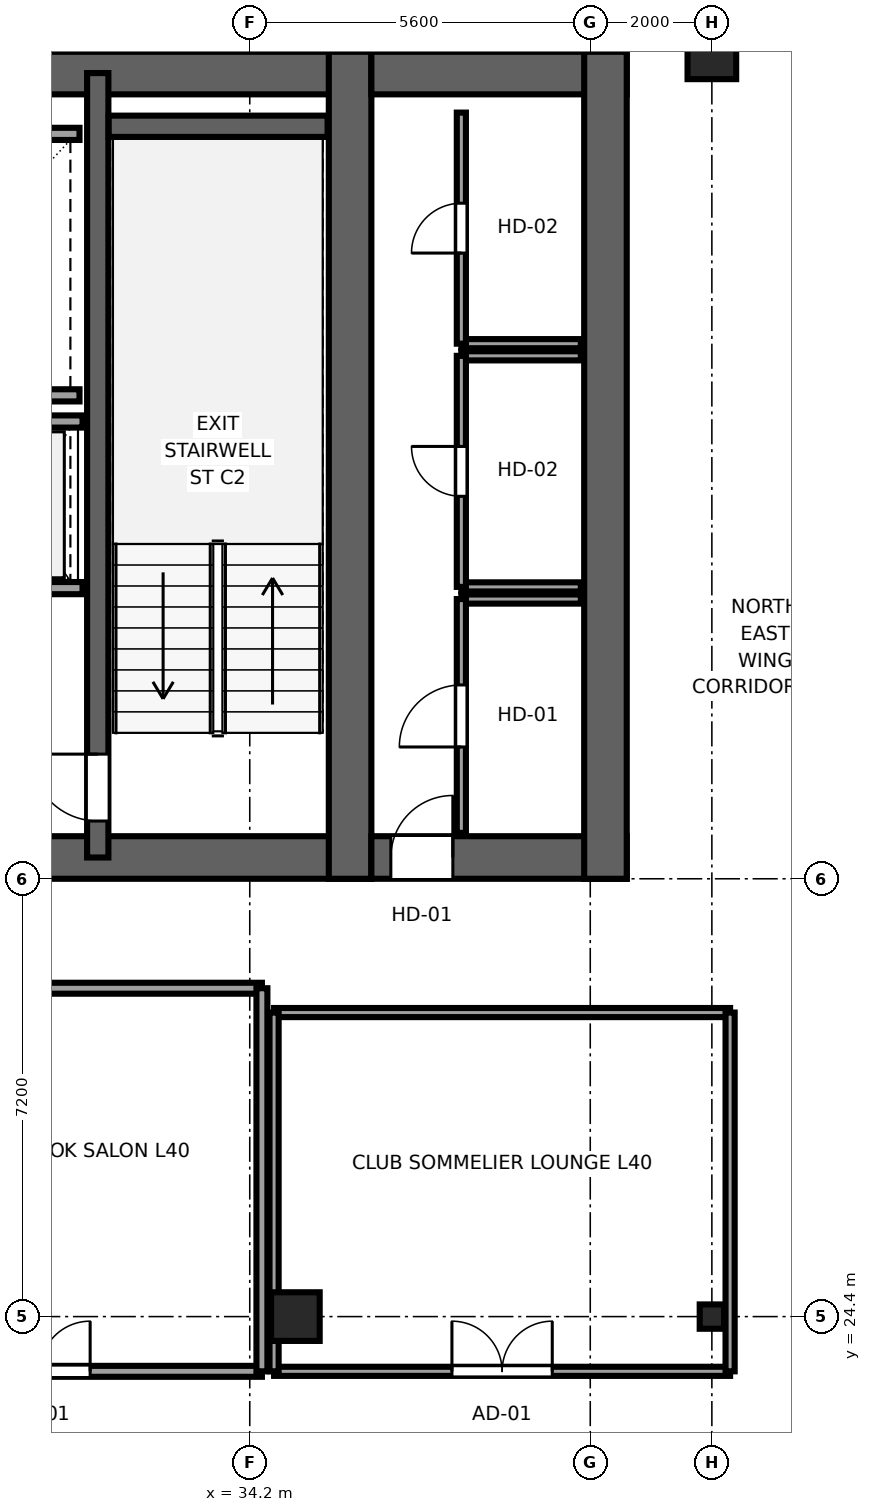
"""IFC4 building model, lengths in metres.
Left out: names, types, materials, properties, quantities, classifications, styles, units other than length and angle.
Written with IfcOpenShell. Run it as: python <this file> out.ifc"""

import sys

from ifc_helpers import new_model, si_unit, direction, frame, frame_2d, origin, origin_2d, place, context, subcontext, project, spatial, rectangle, i_section, extrude, source, transform, mapped, element, fill, save


model = new_model("IFC4")
c1 = context("Model", 3, precision=1e-05, world=origin(), true_north=direction((0.0, 1.0)))
c2 = subcontext(c1, "Body", "Model", "MODEL_VIEW")
j1 = project(units=[si_unit("LENGTHUNIT", "METRE"), si_unit("PLANEANGLEUNIT", "RADIAN")], contexts=[c1])
p1 = place(None, origin())
s1 = spatial("IfcSite", under=j1, at=p1, CompositionType="ELEMENT")
p2 = place(p1, origin())
s2 = spatial("IfcBuilding", under=s1, at=p2, CompositionType="ELEMENT")
p3 = place(p2, frame((0.0, 0.0, 154.15)))
s3 = spatial("IfcBuildingStorey", under=s2, at=p3, CompositionType="ELEMENT", Elevation=154.15)
p4 = place(p3, frame((9.8, 31.95, 0.0), z_axis=(0.0, 0.0, 1.0), x_axis=(1.0, 0.0, 0.0)))
e1 = element("IfcWall", 1, at=p4, inside=s3, PredefinedType="SHEAR", context=c2, shape_type="SweptSolid", body=[
    extrude(rectangle(XDim=26.4, YDim=0.7, at=frame_2d((13.2, 0.0))), origin(), (0.0, 0.0, 1.0), 3.55),
])
p5 = place(p4, frame((6.32, 0.0, 0.0), z_axis=(0.0, 0.0, 1.0), x_axis=(-1.0, 0.0, 0.0)))
e2 = element("IfcOpeningElement", 2, at=p5, cuts=e1, PredefinedType="OPENING", context=c2, shape_type="SweptSolid", body=[
    extrude(rectangle(XDim=1.5, YDim=2.04, at=frame_2d((0.75, 1.02))), frame((0.0, 0.36, 0.0), z_axis=(0.0, -1.0, 0.0), x_axis=(1.0, 0.0, 0.0)), (0.0, 0.0, 1.0), 0.72),
])
p6 = place(p4, frame((13.95, 0.0, 0.0), z_axis=(0.0, 0.0, 1.0), x_axis=(-1.0, 0.0, 0.0)))
e3 = element("IfcOpeningElement", 3, at=p6, cuts=e1, PredefinedType="OPENING", context=c2, shape_type="SweptSolid", body=[
    extrude(rectangle(XDim=1.5, YDim=2.04, at=frame_2d((0.75, 1.02))), frame((0.0, 0.36, 0.0), z_axis=(0.0, -1.0, 0.0), x_axis=(1.0, 0.0, 0.0)), (0.0, 0.0, 1.0), 0.72),
])
p7 = place(p4, frame((20.25, 0.0, 0.0), z_axis=(0.0, 0.0, 1.0), x_axis=(-1.0, 0.0, 0.0)))
e4 = element("IfcOpeningElement", 4, at=p7, cuts=e1, PredefinedType="OPENING", context=c2, shape_type="SweptSolid", body=[
    extrude(rectangle(XDim=1.5, YDim=2.04, at=frame_2d((0.75, 1.02))), frame((0.0, 0.36, 0.0), z_axis=(0.0, -1.0, 0.0), x_axis=(1.0, 0.0, 0.0)), (0.0, 0.0, 1.0), 0.72),
])
p8 = place(p4, frame((8.37, 0.0, 0.0), z_axis=(0.0, 0.0, 1.0), x_axis=(-1.0, 0.0, 0.0)))
e5 = element("IfcOpeningElement", 5, at=p8, cuts=e1, PredefinedType="OPENING", context=c2, shape_type="SweptSolid", body=[
    extrude(rectangle(XDim=0.82, YDim=2.01, at=frame_2d((0.41, 1.005))), frame((0.0, 0.36, 0.0), z_axis=(0.0, -1.0, 0.0), x_axis=(1.0, 0.0, 0.0)), (0.0, 0.0, 1.0), 0.72),
])
p9 = place(p3, frame((9.8, 44.85, 0.0), z_axis=(0.0, 0.0, 1.0), x_axis=(1.0, 0.0, 0.0)))
e6 = element("IfcWall", 6, at=p9, inside=s3, PredefinedType="SHEAR", context=c2, shape_type="SweptSolid", body=[
    extrude(rectangle(XDim=26.4, YDim=0.7, at=frame_2d((13.2, 0.0))), origin(), (0.0, 0.0, 1.0), 3.55),
])
p10 = place(p3, frame((35.85, 31.6, 0.0), z_axis=(0.0, 0.0, 1.0), x_axis=(0.0, 1.0, 0.0)))
e7 = element("IfcWall", 7, at=p10, inside=s3, PredefinedType="SHEAR", context=c2, shape_type="SweptSolid", body=[
    extrude(rectangle(XDim=13.6, YDim=0.7, at=frame_2d((6.8, 0.0))), origin(), (0.0, 0.0, 1.0), 3.55),
])
p11 = place(p3, frame((31.7, 31.95, 0.0), z_axis=(0.0, 0.0, 1.0), x_axis=(0.0, 1.0, 0.0)))
e8 = element("IfcWall", 8, at=p11, inside=s3, PredefinedType="SHEAR", context=c2, shape_type="SweptSolid", body=[
    extrude(rectangle(XDim=12.9, YDim=0.35, at=frame_2d((6.45, 0.0))), origin(), (0.0, 0.0, 1.0), 3.55),
])
p12 = place(p11, frame((1.7, 0.0, 0.0), z_axis=(0.0, 0.0, 1.0), x_axis=(-1.0, 0.0, 0.0)))
e9 = element("IfcOpeningElement", 9, at=p12, cuts=e8, PredefinedType="OPENING", context=c2, shape_type="SweptSolid", body=[
    extrude(rectangle(XDim=1.1, YDim=2.12, at=frame_2d((0.55, 1.06))), frame((0.0, 0.185, 0.0), z_axis=(0.0, -1.0, 0.0), x_axis=(1.0, 0.0, 0.0)), (0.0, 0.0, 1.0), 0.37),
])
p13 = place(p3, frame((36.2, 31.95, 0.0), z_axis=(0.0, 0.0, 1.0), x_axis=(1.0, 0.0, 0.0)))
e10 = element("IfcWall", 10, at=p13, inside=s3, PredefinedType="SHEAR", context=c2, shape_type="SweptSolid", body=[
    extrude(rectangle(XDim=4.2, YDim=0.7, at=frame_2d((2.1, 0.0))), origin(), (0.0, 0.0, 1.0), 3.55),
])
p14 = place(p13, frame((1.34, 0.0, 0.0), z_axis=(0.0, 0.0, 1.0), x_axis=(-1.0, 0.0, 0.0)))
e11 = element("IfcOpeningElement", 11, at=p14, cuts=e10, PredefinedType="OPENING", context=c2, shape_type="SweptSolid", body=[
    extrude(rectangle(XDim=1.02, YDim=2.03, at=frame_2d((0.51, 1.015))), frame((0.0, 0.36, 0.0), z_axis=(0.0, -1.0, 0.0), x_axis=(1.0, 0.0, 0.0)), (0.0, 0.0, 1.0), 0.72),
])
p15 = place(p3, frame((36.2, 44.85, 0.0), z_axis=(0.0, 0.0, 1.0), x_axis=(1.0, 0.0, 0.0)))
e12 = element("IfcWall", 12, at=p15, inside=s3, PredefinedType="SHEAR", context=c2, shape_type="SweptSolid", body=[
    extrude(rectangle(XDim=4.2, YDim=0.7, at=frame_2d((2.1, 0.0))), origin(), (0.0, 0.0, 1.0), 3.55),
])
p16 = place(p3, frame((40.05, 31.6, 0.0), z_axis=(0.0, 0.0, 1.0), x_axis=(0.0, 1.0, 0.0)))
e13 = element("IfcWall", 13, at=p16, inside=s3, PredefinedType="SHEAR", context=c2, shape_type="SweptSolid", body=[
    extrude(rectangle(XDim=13.6, YDim=0.7, at=frame_2d((6.8, 0.0))), origin(), (0.0, 0.0, 1.0), 3.55),
])
p17 = place(p3, frame((31.88, 43.975, 0.0), z_axis=(0.0, 0.0, 1.0), x_axis=(1.0, 0.0, 0.0)))
e14 = element("IfcWall", 14, at=p17, inside=s3, PredefinedType="SHEAR", context=c2, shape_type="SweptSolid", body=[
    extrude(rectangle(XDim=3.6, YDim=0.35, at=frame_2d((1.8, 0.0))), origin(), (0.0, 0.0, 1.0), 3.55),
])
m1 = source(origin(), c2, "Body", "SweptSolid", [
    extrude(rectangle(XDim=0.8, YDim=0.8, at=origin_2d()), origin(), (0.0, 0.0, 1.0), 3.55),
])
p18 = place(p3, frame((34.95, 24.4, 0.0), z_axis=(0.0, 0.0, 1.0), x_axis=(1.0, 0.0, 0.0)))
e15 = element("IfcColumn", 15, at=p18, inside=s3, PredefinedType="COLUMN", context=c2, shape_type="MappedRepresentation", body=[
    mapped(m1, transform((0.0, 0.0, 0.0), x_axis=(1.0, 0.0, 0.0), y_axis=(0.0, 1.0, 0.0), z_axis=(0.0, 0.0, 1.0), scale=1.0)),
])
m2 = source(origin(), c2, "Body", "SweptSolid", [
    extrude(i_section(OverallWidth=0.4, OverallDepth=0.4, WebThickness=0.02, FlangeThickness=0.035, at=origin_2d()), origin(), (0.0, 0.0, 1.0), 3.55),
])
p19 = place(p3, frame((41.8, 24.4, 0.0), z_axis=(0.0, 0.0, 1.0), x_axis=(1.0, 0.0, 0.0)))
e16 = element("IfcColumn", 16, at=p19, inside=s3, PredefinedType="COLUMN", context=c2, shape_type="MappedRepresentation", body=[
    mapped(m2, transform((0.0, 0.0, 0.0), x_axis=(1.0, 0.0, 0.0), y_axis=(0.0, 1.0, 0.0), z_axis=(0.0, 0.0, 1.0), scale=1.0)),
])
p20 = place(p3, frame((41.8, 45.15, 0.0), z_axis=(0.0, 0.0, 1.0), x_axis=(1.0, 0.0, 0.0)))
e17 = element("IfcColumn", 17, at=p20, inside=s3, PredefinedType="COLUMN", context=c2, shape_type="MappedRepresentation", body=[
    mapped(m1, transform((0.0, 0.0, 0.0), x_axis=(1.0, 0.0, 0.0), y_axis=(0.0, 1.0, 0.0), z_axis=(0.0, 0.0, 1.0), scale=1.0)),
])
for number, where, z_axis, x_axis in (
    (18, (27.3, 39.55, 0.0), (0.0, 0.0, 1.0), (1.0, 0.0, 0.0)),
    (19, (27.3, 43.85, 0.0), (0.0, 0.0, 1.0), (1.0, 0.0, 0.0)),
):
    element("IfcWall", number, at=place(p3, frame(where, z_axis=z_axis, x_axis=x_axis)), inside=s3, PredefinedType="SOLIDWALL", context=c2, shape_type="SweptSolid", body=[
        extrude(rectangle(XDim=4.1, YDim=0.2, at=frame_2d((2.05, 0.0))), origin(), (0.0, 0.0, 1.0), 3.37),
    ])
p21 = place(p3, frame((27.375, 36.38, 0.0), z_axis=(0.0, 0.0, 1.0), x_axis=(1.0, 0.0, 0.0)))
e20 = element("IfcWall", 20, at=p21, inside=s3, PredefinedType="SOLIDWALL", context=c2, shape_type="SweptSolid", body=[
    extrude(rectangle(XDim=4.075, YDim=0.2, at=frame_2d((2.038, 0.0))), origin(), (0.0, 0.0, 1.0), 3.37),
])
p22 = place(p21, frame((0.525, 0.0, 0.0)))
e21 = element("IfcOpeningElement", 21, at=p22, cuts=e20, PredefinedType="OPENING", context=c2, shape_type="SweptSolid", body=[
    extrude(rectangle(XDim=1.1, YDim=2.12, at=frame_2d((0.55, 1.06))), frame((0.0, 0.11, 0.0), z_axis=(0.0, -1.0, 0.0), x_axis=(1.0, 0.0, 0.0)), (0.0, 0.0, 1.0), 0.22),
])
p23 = place(p21, frame((2.425, 0.0, 0.0)))
e22 = element("IfcOpeningElement", 22, at=p23, cuts=e20, PredefinedType="OPENING", context=c2, shape_type="SweptSolid", body=[
    extrude(rectangle(XDim=1.1, YDim=2.12, at=frame_2d((0.55, 1.06))), frame((0.0, 0.11, 0.0), z_axis=(0.0, -1.0, 0.0), x_axis=(1.0, 0.0, 0.0)), (0.0, 0.0, 1.0), 0.22),
])
p24 = place(p3, frame((27.375, 39.12, 0.0), z_axis=(0.0, 0.0, 1.0), x_axis=(1.0, 0.0, 0.0)))
e23 = element("IfcWall", 23, at=p24, inside=s3, PredefinedType="SOLIDWALL", context=c2, shape_type="SweptSolid", body=[
    extrude(rectangle(XDim=4.075, YDim=0.2, at=frame_2d((2.038, 0.0))), origin(), (0.0, 0.0, 1.0), 3.37),
])
p25 = place(p3, frame((37.68, 36.2, 0.0), z_axis=(0.0, 0.0, 1.0), x_axis=(1.0, 0.0, 0.0)))
e24 = element("IfcWall", 24, at=p25, inside=s3, PredefinedType="PARTITIONING", context=c2, shape_type="SweptSolid", body=[
    extrude(rectangle(XDim=1.965, YDim=0.15, at=frame_2d((0.982, 0.0))), origin(), (0.0, 0.0, 1.0), 3.37),
])
p26 = place(p3, frame((37.68, 32.355, 0.0), z_axis=(0.0, 0.0, 1.0), x_axis=(0.0, 1.0, 0.0)))
e25 = element("IfcWall", 25, at=p26, inside=s3, PredefinedType="PARTITIONING", context=c2, shape_type="SweptSolid", body=[
    extrude(rectangle(XDim=3.845, YDim=0.15, at=frame_2d((1.922, 0.0))), origin(), (0.0, 0.0, 1.0), 3.37),
])
p27 = place(p26, frame((1.413, 0.0, 0.0)))
e26 = element("IfcOpeningElement", 26, at=p27, cuts=e25, PredefinedType="OPENING", context=c2, shape_type="SweptSolid", body=[
    extrude(rectangle(XDim=1.02, YDim=2.03, at=frame_2d((0.51, 1.015))), frame((0.0, 0.085, 0.0), z_axis=(0.0, -1.0, 0.0), x_axis=(1.0, 0.0, 0.0)), (0.0, 0.0, 1.0), 0.17),
])
for number, where, z_axis, x_axis in (
    (27, (37.68, 36.4, 0.0), (0.0, 0.0, 1.0), (1.0, 0.0, 0.0)),
    (28, (37.68, 40.2, 0.0), (0.0, 0.0, 1.0), (1.0, 0.0, 0.0)),
):
    element("IfcWall", number, at=place(p3, frame(where, z_axis=z_axis, x_axis=x_axis)), inside=s3, PredefinedType="PARTITIONING", context=c2, shape_type="SweptSolid", body=[
        extrude(rectangle(XDim=1.965, YDim=0.15, at=frame_2d((0.982, 0.0))), origin(), (0.0, 0.0, 1.0), 3.37),
    ])
p28 = place(p3, frame((37.68, 36.4, 0.0), z_axis=(0.0, 0.0, 1.0), x_axis=(0.0, 1.0, 0.0)))
e29 = element("IfcWall", 29, at=p28, inside=s3, PredefinedType="PARTITIONING", context=c2, shape_type="SweptSolid", body=[
    extrude(rectangle(XDim=3.8, YDim=0.15, at=frame_2d((1.9, 0.0))), origin(), (0.0, 0.0, 1.0), 3.37),
])
p29 = place(p28, frame((1.49, 0.0, 0.0)))
e30 = element("IfcOpeningElement", 30, at=p29, cuts=e29, PredefinedType="OPENING", context=c2, shape_type="SweptSolid", body=[
    extrude(rectangle(XDim=0.82, YDim=2.01, at=frame_2d((0.41, 1.005))), frame((0.0, 0.085, 0.0), z_axis=(0.0, -1.0, 0.0), x_axis=(1.0, 0.0, 0.0)), (0.0, 0.0, 1.0), 0.17),
])
p30 = place(p3, frame((37.68, 40.4, 0.0), z_axis=(0.0, 0.0, 1.0), x_axis=(1.0, 0.0, 0.0)))
e31 = element("IfcWall", 31, at=p30, inside=s3, PredefinedType="PARTITIONING", context=c2, shape_type="SweptSolid", body=[
    extrude(rectangle(XDim=1.965, YDim=0.15, at=frame_2d((0.982, 0.0))), origin(), (0.0, 0.0, 1.0), 3.37),
])
p31 = place(p3, frame((37.68, 40.4, 0.0), z_axis=(0.0, 0.0, 1.0), x_axis=(0.0, 1.0, 0.0)))
e32 = element("IfcWall", 32, at=p31, inside=s3, PredefinedType="PARTITIONING", context=c2, shape_type="SweptSolid", body=[
    extrude(rectangle(XDim=3.8, YDim=0.15, at=frame_2d((1.9, 0.0))), origin(), (0.0, 0.0, 1.0), 3.37),
])
p32 = place(p31, frame((1.49, 0.0, 0.0)))
e33 = element("IfcOpeningElement", 33, at=p32, cuts=e32, PredefinedType="OPENING", context=c2, shape_type="SweptSolid", body=[
    extrude(rectangle(XDim=0.82, YDim=2.01, at=frame_2d((0.41, 1.005))), frame((0.0, 0.085, 0.0), z_axis=(0.0, -1.0, 0.0), x_axis=(1.0, 0.0, 0.0)), (0.0, 0.0, 1.0), 0.17),
])
p33 = place(p3, frame((27.1, 23.5, 0.0), z_axis=(0.0, 0.0, 1.0), x_axis=(1.0, 0.0, 0.0)))
e34 = element("IfcWall", 34, at=p33, inside=s3, PredefinedType="PARTITIONING", context=c2, shape_type="SweptSolid", body=[
    extrude(rectangle(XDim=7.3, YDim=0.18, at=frame_2d((3.65, 0.0))), origin(), (0.0, 0.0, 1.0), 3.37),
])
p34 = place(p33, frame((2.825, 0.0, 0.0)))
e35 = element("IfcOpeningElement", 35, at=p34, cuts=e34, PredefinedType="OPENING", context=c2, shape_type="SweptSolid", body=[
    extrude(rectangle(XDim=1.65, YDim=2.15, at=frame_2d((0.825, 1.075))), frame((0.0, 0.1, 0.0), z_axis=(0.0, -1.0, 0.0), x_axis=(1.0, 0.0, 0.0)), (0.0, 0.0, 1.0), 0.2),
])
p35 = place(p3, frame((27.1, 29.8, 0.0), z_axis=(0.0, 0.0, 1.0), x_axis=(1.0, 0.0, 0.0)))
e36 = element("IfcWall", 36, at=p35, inside=s3, PredefinedType="PARTITIONING", context=c2, shape_type="SweptSolid", body=[
    extrude(rectangle(XDim=7.3, YDim=0.18, at=frame_2d((3.65, 0.0))), origin(), (0.0, 0.0, 1.0), 3.37),
])
p36 = place(p3, frame((34.4, 23.5, 0.0), z_axis=(0.0, 0.0, 1.0), x_axis=(0.0, 1.0, 0.0)))
e37 = element("IfcWall", 37, at=p36, inside=s3, PredefinedType="PARTITIONING", context=c2, shape_type="SweptSolid", body=[
    extrude(rectangle(XDim=6.3, YDim=0.18, at=frame_2d((3.15, 0.0))), origin(), (0.0, 0.0, 1.0), 3.37),
])
p37 = place(p3, frame((34.6, 23.5, 0.0), z_axis=(0.0, 0.0, 1.0), x_axis=(1.0, 0.0, 0.0)))
e38 = element("IfcWall", 38, at=p37, inside=s3, PredefinedType="PARTITIONING", context=c2, shape_type="SweptSolid", body=[
    extrude(rectangle(XDim=7.5, YDim=0.15, at=frame_2d((3.75, 0.0))), origin(), (0.0, 0.0, 1.0), 3.37),
])
p38 = place(p37, frame((2.925, 0.0, 0.0)))
e39 = element("IfcOpeningElement", 39, at=p38, cuts=e38, PredefinedType="OPENING", context=c2, shape_type="SweptSolid", body=[
    extrude(rectangle(XDim=1.65, YDim=2.15, at=frame_2d((0.825, 1.075))), frame((0.0, 0.085, 0.0), z_axis=(0.0, -1.0, 0.0), x_axis=(1.0, 0.0, 0.0)), (0.0, 0.0, 1.0), 0.17),
])
p39 = place(p3, frame((34.6, 29.4, 0.0), z_axis=(0.0, 0.0, 1.0), x_axis=(1.0, 0.0, 0.0)))
e40 = element("IfcWall", 40, at=p39, inside=s3, PredefinedType="PARTITIONING", context=c2, shape_type="SweptSolid", body=[
    extrude(rectangle(XDim=7.5, YDim=0.15, at=frame_2d((3.75, 0.0))), origin(), (0.0, 0.0, 1.0), 3.37),
])
p40 = place(p3, frame((34.6, 23.5, 0.0), z_axis=(0.0, 0.0, 1.0), x_axis=(0.0, 1.0, 0.0)))
e41 = element("IfcWall", 41, at=p40, inside=s3, PredefinedType="PARTITIONING", context=c2, shape_type="SweptSolid", body=[
    extrude(rectangle(XDim=5.9, YDim=0.15, at=frame_2d((2.95, 0.0))), origin(), (0.0, 0.0, 1.0), 3.37),
])
p41 = place(p3, frame((42.1, 23.5, 0.0), z_axis=(0.0, 0.0, 1.0), x_axis=(0.0, 1.0, 0.0)))
e42 = element("IfcWall", 42, at=p41, inside=s3, PredefinedType="PARTITIONING", context=c2, shape_type="SweptSolid", body=[
    extrude(rectangle(XDim=5.9, YDim=0.15, at=frame_2d((2.95, 0.0))), origin(), (0.0, 0.0, 1.0), 2.16),
])
m3 = source(origin(), c2, "Body", "SweptSolid", [
    extrude(rectangle(XDim=1.1, YDim=2.12, at=frame_2d((0.55, 1.06))), frame((0.0, 0.025, 0.0), z_axis=(0.0, -1.0, 0.0), x_axis=(1.0, 0.0, 0.0)), (0.0, 0.0, 1.0), 0.05),
])
p42 = place(p12, origin())
e43 = element("IfcDoor", 43, at=p42, inside=s3, OperationType="SINGLE_SWING_RIGHT", PredefinedType="DOOR", context=c2, shape_type="MappedRepresentation", body=[
    mapped(m3, transform((0.0, 0.0, 0.0), x_axis=(1.0, 0.0, 0.0), y_axis=(0.0, 1.0, 0.0), z_axis=(0.0, 0.0, 1.0), scale=1.0)),
])
fill(e9, e43)
m4 = source(origin(), c2, "Body", "SweptSolid", [
    extrude(rectangle(XDim=1.02, YDim=2.03, at=frame_2d((0.51, 1.015))), frame((0.0, 0.025, 0.0), z_axis=(0.0, -1.0, 0.0), x_axis=(1.0, 0.0, 0.0)), (0.0, 0.0, 1.0), 0.05),
])
p43 = place(p14, origin())
e44 = element("IfcDoor", 44, at=p43, inside=s3, OperationType="SINGLE_SWING_RIGHT", PredefinedType="DOOR", context=c2, shape_type="MappedRepresentation", body=[
    mapped(m4, transform((0.0, 0.0, 0.0), x_axis=(1.0, 0.0, 0.0), y_axis=(0.0, 1.0, 0.0), z_axis=(0.0, 0.0, 1.0), scale=1.0)),
])
fill(e11, e44)
p44 = place(p27, origin())
e45 = element("IfcDoor", 45, at=p44, inside=s3, OperationType="SINGLE_SWING_LEFT", PredefinedType="DOOR", context=c2, shape_type="MappedRepresentation", body=[
    mapped(m4, transform((0.0, 0.0, 0.0), x_axis=(1.0, 0.0, 0.0), y_axis=(0.0, 1.0, 0.0), z_axis=(0.0, 0.0, 1.0), scale=1.0)),
])
fill(e26, e45)
m5 = source(origin(), c2, "Body", "SweptSolid", [
    extrude(rectangle(XDim=0.82, YDim=2.01, at=frame_2d((0.41, 1.005))), frame((0.0, 0.025, 0.0), z_axis=(0.0, -1.0, 0.0), x_axis=(1.0, 0.0, 0.0)), (0.0, 0.0, 1.0), 0.05),
])
p45 = place(p29, origin())
e46 = element("IfcDoor", 46, at=p45, inside=s3, OperationType="SINGLE_SWING_RIGHT", PredefinedType="DOOR", context=c2, shape_type="MappedRepresentation", body=[
    mapped(m5, transform((0.0, 0.0, 0.0), x_axis=(1.0, 0.0, 0.0), y_axis=(0.0, 1.0, 0.0), z_axis=(0.0, 0.0, 1.0), scale=1.0)),
])
fill(e30, e46)
p46 = place(p32, origin())
e47 = element("IfcDoor", 47, at=p46, inside=s3, OperationType="SINGLE_SWING_LEFT", PredefinedType="DOOR", context=c2, shape_type="MappedRepresentation", body=[
    mapped(m5, transform((0.0, 0.0, 0.0), x_axis=(1.0, 0.0, 0.0), y_axis=(0.0, 1.0, 0.0), z_axis=(0.0, 0.0, 1.0), scale=1.0)),
])
fill(e33, e47)
m6 = source(origin(), c2, "Body", "SweptSolid", [
    extrude(rectangle(XDim=1.65, YDim=2.15, at=frame_2d((0.825, 1.075))), frame((0.0, 0.025, 0.0), z_axis=(0.0, -1.0, 0.0), x_axis=(1.0, 0.0, 0.0)), (0.0, 0.0, 1.0), 0.05),
])
p47 = place(p34, origin())
e48 = element("IfcDoor", 48, at=p47, inside=s3, OperationType="DOUBLE_DOOR_SINGLE_SWING", PredefinedType="DOOR", context=c2, shape_type="MappedRepresentation", body=[
    mapped(m6, transform((0.0, 0.0, 0.0), x_axis=(1.0, 0.0, 0.0), y_axis=(0.0, 1.0, 0.0), z_axis=(0.0, 0.0, 1.0), scale=1.0)),
])
fill(e35, e48)
p48 = place(p38, origin())
e49 = element("IfcDoor", 49, at=p48, inside=s3, OperationType="DOUBLE_DOOR_SINGLE_SWING", PredefinedType="DOOR", context=c2, shape_type="MappedRepresentation", body=[
    mapped(m6, transform((0.0, 0.0, 0.0), x_axis=(1.0, 0.0, 0.0), y_axis=(0.0, 1.0, 0.0), z_axis=(0.0, 0.0, 1.0), scale=1.0)),
])
fill(e39, e49)
save(model, sys.argv[1])
